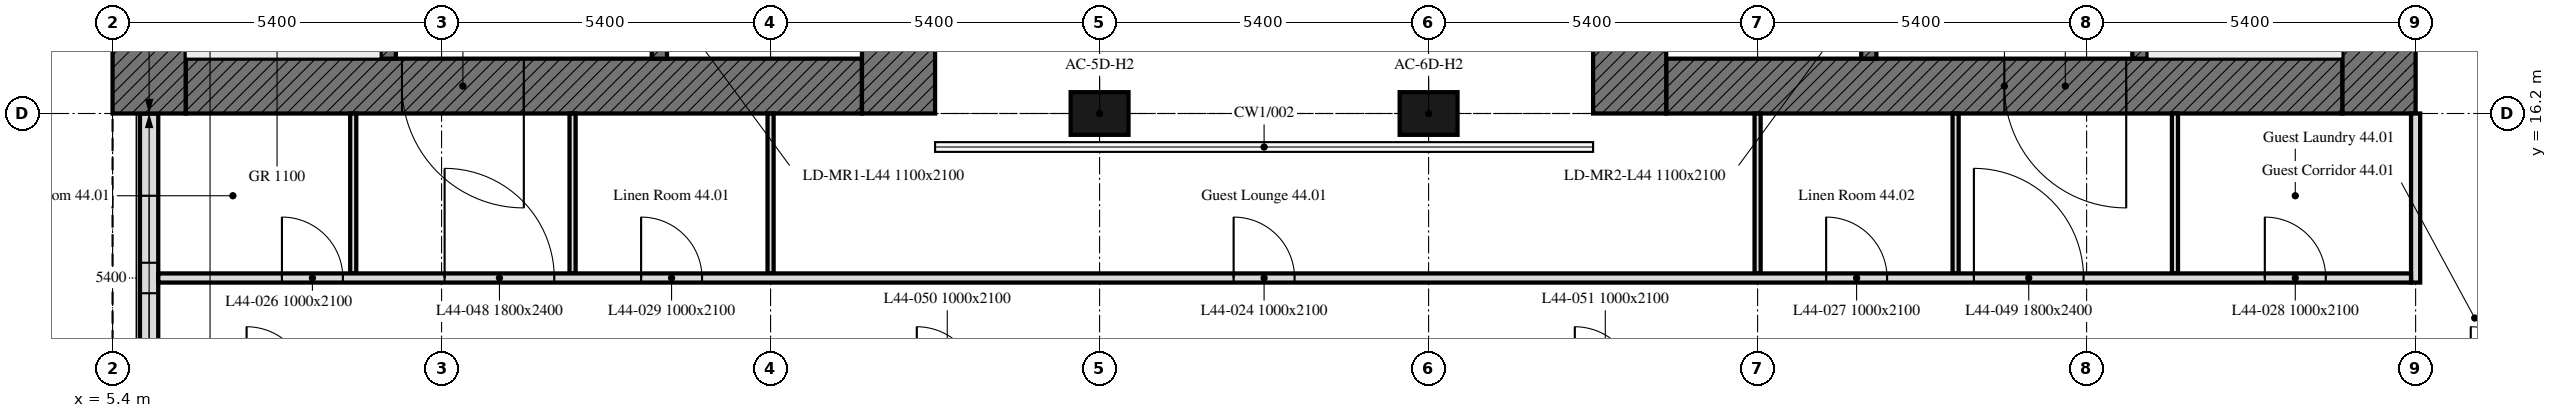
"""IFC4 building model, lengths in metres.
Left out: names, types, materials, properties, quantities, classifications, styles, units other than length and angle.
Written with IfcOpenShell. Run it as: python <this file> out.ifc"""

import sys

from ifc_helpers import new_model, si_unit, direction, frame, frame_2d, origin, origin_2d, place, context, subcontext, project, spatial, rectangle, extrude, element, fill, save


model = new_model("IFC4")
c1 = context("Model", 3, precision=1e-05, world=origin(), true_north=direction((0.0, 1.0)))
c2 = subcontext(c1, "Body", "Model", "MODEL_VIEW")
j1 = project(units=[si_unit("LENGTHUNIT", "METRE"), si_unit("PLANEANGLEUNIT", "RADIAN")], contexts=[c1])
p1 = place(None, origin())
s1 = spatial("IfcSite", under=j1, at=p1, CompositionType="ELEMENT")
p2 = place(p1, origin())
s2 = spatial("IfcBuilding", under=s1, at=p2, CompositionType="ELEMENT")
p3 = place(p2, frame((0.0, 0.0, 184.0)))
s3 = spatial("IfcBuildingStorey", under=s2, at=p3, CompositionType="ELEMENT", Elevation=184.0)
for number, where, z_axis, x_axis in (
    (1, (21.6, 16.2, 0.0), (0.0, 0.0, 1.0), (1.0, 0.0, 0.0)),
    (2, (27.0, 16.2, 0.0), (0.0, 0.0, 1.0), (1.0, 0.0, 0.0)),
):
    element("IfcColumn", number, at=place(p3, frame(where, z_axis=z_axis, x_axis=x_axis)), inside=s3, PredefinedType="COLUMN", context=c2, shape_type="SweptSolid", body=[
        extrude(rectangle(XDim=0.95, YDim=0.7, at=origin_2d()), origin(), (0.0, 0.0, 1.0), 3.0),
    ])
p4 = place(p3, frame((6.0, 16.2, 0.0), z_axis=(0.0, 0.0, 1.0), x_axis=(0.0, -1.0, 0.0)))
e3 = element("IfcWall", 3, at=p4, inside=s3, PredefinedType="SOLIDWALL", context=c2, shape_type="SweptSolid", body=[
    extrude(rectangle(XDim=5.214, YDim=0.3, at=frame_2d((2.607, 0.0))), origin(), (0.0, 0.0, 1.0), 3.0),
])
p5 = place(p4, frame((1.35, 0.0, 0.9)))
e4 = element("IfcOpeningElement", 4, at=p5, cuts=e3, PredefinedType="OPENING", context=c2, shape_type="SweptSolid", body=[
    extrude(rectangle(XDim=1.1, YDim=1.7, at=frame_2d((0.55, 0.85))), frame((0.0, 0.16, 0.0), z_axis=(0.0, -1.0, 0.0), x_axis=(1.0, 0.0, 0.0)), (0.0, 0.0, 1.0), 0.32),
])
p6 = place(p4, frame((2.95, 0.0, 0.9)))
e5 = element("IfcOpeningElement", 5, at=p6, cuts=e3, PredefinedType="OPENING", context=c2, shape_type="SweptSolid", body=[
    extrude(rectangle(XDim=1.1, YDim=1.7, at=frame_2d((0.55, 0.85))), frame((0.0, 0.16, 0.0), z_axis=(0.0, -1.0, 0.0), x_axis=(1.0, 0.0, 0.0)), (0.0, 0.0, 1.0), 0.32),
])
p7 = place(p3, frame((17.7, 16.65, 0.0), z_axis=(0.0, 0.0, 1.0), x_axis=(-1.0, 0.0, 0.0)))
e6 = element("IfcWall", 6, at=p7, inside=s3, PredefinedType="SOLIDWALL", context=c2, shape_type="SweptSolid", body=[
    extrude(rectangle(XDim=11.1, YDim=0.9, at=frame_2d((5.55, 0.0))), origin(), (0.0, 0.0, 1.0), 3.0),
])
p8 = place(p7, frame((5.55, 0.0, 0.0)))
e7 = element("IfcOpeningElement", 7, at=p8, cuts=e6, PredefinedType="OPENING", context=c2, shape_type="SweptSolid", body=[
    extrude(rectangle(XDim=2.0, YDim=2.4, at=frame_2d((1.0, 1.2))), frame((0.0, 0.45, 0.0), z_axis=(0.0, -1.0, 0.0), x_axis=(1.0, 0.0, 0.0)), (0.0, 0.0, 1.0), 0.9),
])
for number, where, z_axis, x_axis in (
    (8, (6.0, 16.2, 0.0), (0.0, 0.0, 1.0), (0.0, 1.0, 0.0)),
    (9, (18.3, 32.4, 0.0), (0.0, 0.0, 1.0), (0.0, -1.0, 0.0)),
):
    element("IfcWall", number, at=place(p3, frame(where, z_axis=z_axis, x_axis=x_axis)), inside=s3, PredefinedType="SOLIDWALL", context=c2, shape_type="SweptSolid", body=[
        extrude(rectangle(XDim=16.2, YDim=1.2, at=frame_2d((8.1, 0.0))), origin(), (0.0, 0.0, 1.0), 3.0),
    ])
p9 = place(p3, frame((9.925, 17.1, 0.0), z_axis=(0.0, 0.0, 1.0), x_axis=(0.0, 1.0, 0.0)))
e10 = element("IfcWall", 10, at=p9, inside=s3, PredefinedType="SOLIDWALL", context=c2, shape_type="SweptSolid", body=[
    extrude(rectangle(XDim=14.4, YDim=0.25, at=frame_2d((7.2, 0.0))), origin(), (0.0, 0.0, 1.0), 3.0),
])
p10 = place(p9, frame((4.6, 0.0, 0.0)))
e11 = element("IfcOpeningElement", 11, at=p10, cuts=e10, PredefinedType="OPENING", context=c2, shape_type="SweptSolid", body=[
    extrude(rectangle(XDim=1.0, YDim=2.1, at=frame_2d((0.5, 1.05))), frame((0.0, 0.125, 0.0), z_axis=(0.0, -1.0, 0.0), x_axis=(1.0, 0.0, 0.0)), (0.0, 0.0, 1.0), 0.25),
])
p11 = place(p9, frame((7.062, 0.0, 0.0)))
e12 = element("IfcOpeningElement", 12, at=p11, cuts=e10, PredefinedType="OPENING", context=c2, shape_type="SweptSolid", body=[
    extrude(rectangle(XDim=1.2, YDim=2.1, at=frame_2d((0.6, 1.05))), frame((0.0, 0.125, 0.0), z_axis=(0.0, -1.0, 0.0), x_axis=(1.0, 0.0, 0.0)), (0.0, 0.0, 1.0), 0.25),
])
p12 = place(p9, frame((9.726, 0.0, 0.0)))
e13 = element("IfcOpeningElement", 13, at=p12, cuts=e10, PredefinedType="OPENING", context=c2, shape_type="SweptSolid", body=[
    extrude(rectangle(XDim=0.9, YDim=2.1, at=frame_2d((0.45, 1.05))), frame((0.0, 0.125, 0.0), z_axis=(0.0, -1.0, 0.0), x_axis=(1.0, 0.0, 0.0)), (0.0, 0.0, 1.0), 0.25),
])
p13 = place(p9, frame((11.539, 0.0, 0.0)))
e14 = element("IfcOpeningElement", 14, at=p13, cuts=e10, PredefinedType="OPENING", context=c2, shape_type="SweptSolid", body=[
    extrude(rectangle(XDim=0.9, YDim=2.1, at=frame_2d((0.45, 1.05))), frame((0.0, 0.125, 0.0), z_axis=(0.0, -1.0, 0.0), x_axis=(1.0, 0.0, 0.0)), (0.0, 0.0, 1.0), 0.25),
])
p14 = place(p9, frame((13.226, 0.0, 0.0)))
e15 = element("IfcOpeningElement", 15, at=p14, cuts=e10, PredefinedType="OPENING", context=c2, shape_type="SweptSolid", body=[
    extrude(rectangle(XDim=0.9, YDim=2.1, at=frame_2d((0.45, 1.05))), frame((0.0, 0.125, 0.0), z_axis=(0.0, -1.0, 0.0), x_axis=(1.0, 0.0, 0.0)), (0.0, 0.0, 1.0), 0.25),
])
p15 = place(p3, frame((14.375, 17.1, 0.0), z_axis=(0.0, 0.0, 1.0), x_axis=(0.0, 1.0, 0.0)))
e16 = element("IfcWall", 16, at=p15, inside=s3, PredefinedType="SOLIDWALL", context=c2, shape_type="SweptSolid", body=[
    extrude(rectangle(XDim=14.4, YDim=0.25, at=frame_2d((7.2, 0.0))), origin(), (0.0, 0.0, 1.0), 3.0),
])
p16 = place(p15, frame((13.15, 0.0, 0.0)))
e17 = element("IfcOpeningElement", 17, at=p16, cuts=e16, PredefinedType="OPENING", context=c2, shape_type="SweptSolid", body=[
    extrude(rectangle(XDim=1.0, YDim=2.1, at=frame_2d((0.5, 1.05))), frame((0.0, 0.125, 0.0), z_axis=(0.0, -1.0, 0.0), x_axis=(1.0, 0.0, 0.0)), (0.0, 0.0, 1.0), 0.25),
])
p17 = place(p15, frame((0.6, 0.0, 0.0)))
e18 = element("IfcOpeningElement", 18, at=p17, cuts=e16, PredefinedType="OPENING", context=c2, shape_type="SweptSolid", body=[
    extrude(rectangle(XDim=1.1, YDim=2.1, at=frame_2d((0.55, 1.05))), frame((0.0, 0.125, 0.0), z_axis=(0.0, -1.0, 0.0), x_axis=(1.0, 0.0, 0.0)), (0.0, 0.0, 1.0), 0.25),
])
p18 = place(p15, frame((3.25, 0.0, 0.0)))
e19 = element("IfcOpeningElement", 19, at=p18, cuts=e16, PredefinedType="OPENING", context=c2, shape_type="SweptSolid", body=[
    extrude(rectangle(XDim=0.9, YDim=2.1, at=frame_2d((0.45, 1.05))), frame((0.0, 0.125, 0.0), z_axis=(0.0, -1.0, 0.0), x_axis=(1.0, 0.0, 0.0)), (0.0, 0.0, 1.0), 0.25),
])
p19 = place(p3, frame((42.0, 16.65, 0.0), z_axis=(0.0, 0.0, 1.0), x_axis=(-1.0, 0.0, 0.0)))
e20 = element("IfcWall", 20, at=p19, inside=s3, PredefinedType="SOLIDWALL", context=c2, shape_type="SweptSolid", body=[
    extrude(rectangle(XDim=11.1, YDim=0.9, at=frame_2d((5.55, 0.0))), origin(), (0.0, 0.0, 1.0), 3.0),
])
p20 = place(p19, frame((3.55, 0.0, 0.0)))
e21 = element("IfcOpeningElement", 21, at=p20, cuts=e20, PredefinedType="OPENING", context=c2, shape_type="SweptSolid", body=[
    extrude(rectangle(XDim=2.0, YDim=2.4, at=frame_2d((1.0, 1.2))), frame((0.0, 0.45, 0.0), z_axis=(0.0, -1.0, 0.0), x_axis=(1.0, 0.0, 0.0)), (0.0, 0.0, 1.0), 0.9),
])
for number, where, z_axis, x_axis in (
    (22, (42.6, 32.4, 0.0), (0.0, 0.0, 1.0), (0.0, -1.0, 0.0)),
    (23, (30.3, 16.2, 0.0), (0.0, 0.0, 1.0), (0.0, 1.0, 0.0)),
):
    element("IfcWall", number, at=place(p3, frame(where, z_axis=z_axis, x_axis=x_axis)), inside=s3, PredefinedType="SOLIDWALL", context=c2, shape_type="SweptSolid", body=[
        extrude(rectangle(XDim=16.2, YDim=1.2, at=frame_2d((8.1, 0.0))), origin(), (0.0, 0.0, 1.0), 3.0),
    ])
p21 = place(p3, frame((38.675, 17.1, 0.0), z_axis=(0.0, 0.0, 1.0), x_axis=(0.0, 1.0, 0.0)))
e24 = element("IfcWall", 24, at=p21, inside=s3, PredefinedType="SOLIDWALL", context=c2, shape_type="SweptSolid", body=[
    extrude(rectangle(XDim=14.4, YDim=0.25, at=frame_2d((7.2, 0.0))), origin(), (0.0, 0.0, 1.0), 3.0),
])
p22 = place(p21, frame((4.6, 0.0, 0.0)))
e25 = element("IfcOpeningElement", 25, at=p22, cuts=e24, PredefinedType="OPENING", context=c2, shape_type="SweptSolid", body=[
    extrude(rectangle(XDim=1.0, YDim=2.1, at=frame_2d((0.5, 1.05))), frame((0.0, 0.125, 0.0), z_axis=(0.0, -1.0, 0.0), x_axis=(1.0, 0.0, 0.0)), (0.0, 0.0, 1.0), 0.25),
])
p23 = place(p21, frame((7.062, 0.0, 0.0)))
e26 = element("IfcOpeningElement", 26, at=p23, cuts=e24, PredefinedType="OPENING", context=c2, shape_type="SweptSolid", body=[
    extrude(rectangle(XDim=1.2, YDim=2.1, at=frame_2d((0.6, 1.05))), frame((0.0, 0.125, 0.0), z_axis=(0.0, -1.0, 0.0), x_axis=(1.0, 0.0, 0.0)), (0.0, 0.0, 1.0), 0.25),
])
p24 = place(p21, frame((9.979, 0.0, 0.0)))
e27 = element("IfcOpeningElement", 27, at=p24, cuts=e24, PredefinedType="OPENING", context=c2, shape_type="SweptSolid", body=[
    extrude(rectangle(XDim=0.9, YDim=2.1, at=frame_2d((0.45, 1.05))), frame((0.0, 0.125, 0.0), z_axis=(0.0, -1.0, 0.0), x_axis=(1.0, 0.0, 0.0)), (0.0, 0.0, 1.0), 0.25),
])
p25 = place(p21, frame((11.92, 0.0, 0.0)))
e28 = element("IfcOpeningElement", 28, at=p25, cuts=e24, PredefinedType="OPENING", context=c2, shape_type="SweptSolid", body=[
    extrude(rectangle(XDim=0.9, YDim=2.1, at=frame_2d((0.45, 1.05))), frame((0.0, 0.125, 0.0), z_axis=(0.0, -1.0, 0.0), x_axis=(1.0, 0.0, 0.0)), (0.0, 0.0, 1.0), 0.25),
])
p26 = place(p21, frame((13.354, 0.0, 0.0)))
e29 = element("IfcOpeningElement", 29, at=p26, cuts=e24, PredefinedType="OPENING", context=c2, shape_type="SweptSolid", body=[
    extrude(rectangle(XDim=0.9, YDim=2.1, at=frame_2d((0.45, 1.05))), frame((0.0, 0.125, 0.0), z_axis=(0.0, -1.0, 0.0), x_axis=(1.0, 0.0, 0.0)), (0.0, 0.0, 1.0), 0.25),
])
p27 = place(p3, frame((34.225, 17.1, 0.0), z_axis=(0.0, 0.0, 1.0), x_axis=(0.0, 1.0, 0.0)))
e30 = element("IfcWall", 30, at=p27, inside=s3, PredefinedType="SOLIDWALL", context=c2, shape_type="SweptSolid", body=[
    extrude(rectangle(XDim=14.4, YDim=0.25, at=frame_2d((7.2, 0.0))), origin(), (0.0, 0.0, 1.0), 3.0),
])
p28 = place(p27, frame((13.15, 0.0, 0.0)))
e31 = element("IfcOpeningElement", 31, at=p28, cuts=e30, PredefinedType="OPENING", context=c2, shape_type="SweptSolid", body=[
    extrude(rectangle(XDim=1.0, YDim=2.1, at=frame_2d((0.5, 1.05))), frame((0.0, 0.125, 0.0), z_axis=(0.0, -1.0, 0.0), x_axis=(1.0, 0.0, 0.0)), (0.0, 0.0, 1.0), 0.25),
])
p29 = place(p27, frame((0.6, 0.0, 0.0)))
e32 = element("IfcOpeningElement", 32, at=p29, cuts=e30, PredefinedType="OPENING", context=c2, shape_type="SweptSolid", body=[
    extrude(rectangle(XDim=1.1, YDim=2.1, at=frame_2d((0.55, 1.05))), frame((0.0, 0.125, 0.0), z_axis=(0.0, -1.0, 0.0), x_axis=(1.0, 0.0, 0.0)), (0.0, 0.0, 1.0), 0.25),
])
p30 = place(p27, frame((3.25, 0.0, 0.0)))
e33 = element("IfcOpeningElement", 33, at=p30, cuts=e30, PredefinedType="OPENING", context=c2, shape_type="SweptSolid", body=[
    extrude(rectangle(XDim=0.9, YDim=2.1, at=frame_2d((0.45, 1.05))), frame((0.0, 0.125, 0.0), z_axis=(0.0, -1.0, 0.0), x_axis=(1.0, 0.0, 0.0)), (0.0, 0.0, 1.0), 0.25),
])
for number, where, z_axis, x_axis in (
    (34, (16.2, 16.2, 0.0), (0.0, 0.0, 1.0), (0.0, -1.0, 0.0)),
    (35, (32.4, 13.575, 0.0), (0.0, 0.0, 1.0), (0.0, 1.0, 0.0)),
    (36, (9.35, 16.2, 0.0), (0.0, 0.0, 1.0), (0.0, -1.0, 0.0)),
    (37, (12.95, 13.575, 0.0), (0.0, 0.0, 1.0), (0.0, 1.0, 0.0)),
    (38, (35.65, 16.2, 0.0), (0.0, 0.0, 1.0), (0.0, -1.0, 0.0)),
    (39, (39.25, 13.575, 0.0), (0.0, 0.0, 1.0), (0.0, 1.0, 0.0)),
):
    element("IfcWall", number, at=place(p3, frame(where, z_axis=z_axis, x_axis=x_axis)), inside=s3, PredefinedType="PARTITIONING", context=c2, shape_type="SweptSolid", body=[
        extrude(rectangle(XDim=2.625, YDim=0.1, at=frame_2d((1.312, 0.0))), origin(), (0.0, 0.0, 1.0), 3.0),
    ])
p31 = place(p3, frame((43.2, 16.2, 0.0), z_axis=(0.0, 0.0, 1.0), x_axis=(0.0, -1.0, 0.0)))
e40 = element("IfcWall", 40, at=p31, inside=s3, PredefinedType="PARTITIONING", context=c2, shape_type="SweptSolid", body=[
    extrude(rectangle(XDim=2.775, YDim=0.15, at=frame_2d((1.387, 0.0))), origin(), (0.0, 0.0, 1.0), 3.0),
])
p32 = place(p3, frame((6.151, 13.5, 0.0), z_axis=(0.0, 0.0, 1.0), x_axis=(1.0, 0.0, 0.0)))
e41 = element("IfcWall", 41, at=p32, inside=s3, PredefinedType="PARTITIONING", context=c2, shape_type="SweptSolid", body=[
    extrude(rectangle(XDim=36.974, YDim=0.15, at=frame_2d((18.487, 0.0))), origin(), (0.0, 0.0, 1.0), 3.0),
])
p33 = place(p32, frame((17.649, 0.0, 0.0)))
e42 = element("IfcOpeningElement", 42, at=p33, cuts=e41, PredefinedType="OPENING", context=c2, shape_type="SweptSolid", body=[
    extrude(rectangle(XDim=1.0, YDim=2.1, at=frame_2d((0.5, 1.05))), frame((0.0, 0.075, 0.0), z_axis=(0.0, -1.0, 0.0), x_axis=(1.0, 0.0, 0.0)), (0.0, 0.0, 1.0), 0.15),
])
p34 = place(p32, frame((2.029, 0.0, 0.0)))
e43 = element("IfcOpeningElement", 43, at=p34, cuts=e41, PredefinedType="OPENING", context=c2, shape_type="SweptSolid", body=[
    extrude(rectangle(XDim=1.0, YDim=2.1, at=frame_2d((0.5, 1.05))), frame((0.0, 0.075, 0.0), z_axis=(0.0, -1.0, 0.0), x_axis=(1.0, 0.0, 0.0)), (0.0, 0.0, 1.0), 0.15),
])
p35 = place(p32, frame((27.374, 0.0, 0.0)))
e44 = element("IfcOpeningElement", 44, at=p35, cuts=e41, PredefinedType="OPENING", context=c2, shape_type="SweptSolid", body=[
    extrude(rectangle(XDim=1.0, YDim=2.1, at=frame_2d((0.5, 1.05))), frame((0.0, 0.075, 0.0), z_axis=(0.0, -1.0, 0.0), x_axis=(1.0, 0.0, 0.0)), (0.0, 0.0, 1.0), 0.15),
])
p36 = place(p32, frame((34.574, 0.0, 0.0)))
e45 = element("IfcOpeningElement", 45, at=p36, cuts=e41, PredefinedType="OPENING", context=c2, shape_type="SweptSolid", body=[
    extrude(rectangle(XDim=1.0, YDim=2.1, at=frame_2d((0.5, 1.05))), frame((0.0, 0.075, 0.0), z_axis=(0.0, -1.0, 0.0), x_axis=(1.0, 0.0, 0.0)), (0.0, 0.0, 1.0), 0.15),
])
p37 = place(p32, frame((7.924, 0.0, 0.0)))
e46 = element("IfcOpeningElement", 46, at=p37, cuts=e41, PredefinedType="OPENING", context=c2, shape_type="SweptSolid", body=[
    extrude(rectangle(XDim=1.0, YDim=2.1, at=frame_2d((0.5, 1.05))), frame((0.0, 0.075, 0.0), z_axis=(0.0, -1.0, 0.0), x_axis=(1.0, 0.0, 0.0)), (0.0, 0.0, 1.0), 0.15),
])
p38 = place(p32, frame((4.699, 0.0, 0.0)))
e47 = element("IfcOpeningElement", 47, at=p38, cuts=e41, PredefinedType="OPENING", context=c2, shape_type="SweptSolid", body=[
    extrude(rectangle(XDim=1.8, YDim=2.4, at=frame_2d((0.9, 1.2))), frame((0.0, 0.075, 0.0), z_axis=(0.0, -1.0, 0.0), x_axis=(1.0, 0.0, 0.0)), (0.0, 0.0, 1.0), 0.15),
])
p39 = place(p32, frame((29.799, 0.0, 0.0)))
e48 = element("IfcOpeningElement", 48, at=p39, cuts=e41, PredefinedType="OPENING", context=c2, shape_type="SweptSolid", body=[
    extrude(rectangle(XDim=1.8, YDim=2.4, at=frame_2d((0.9, 1.2))), frame((0.0, 0.075, 0.0), z_axis=(0.0, -1.0, 0.0), x_axis=(1.0, 0.0, 0.0)), (0.0, 0.0, 1.0), 0.15),
])
p40 = place(p5, origin())
e49 = element("IfcWindow", 49, at=p40, inside=s3, PartitioningType="SINGLE_PANEL", PredefinedType="WINDOW", context=c2, shape_type="SweptSolid", body=[
    extrude(rectangle(XDim=1.1, YDim=1.7, at=frame_2d((0.55, 0.85))), frame((0.0, 0.03, 0.0), z_axis=(0.0, -1.0, 0.0), x_axis=(1.0, 0.0, 0.0)), (0.0, 0.0, 1.0), 0.06),
])
fill(e4, e49)
p41 = place(p6, origin())
e50 = element("IfcWindow", 50, at=p41, inside=s3, PartitioningType="SINGLE_PANEL", PredefinedType="WINDOW", context=c2, shape_type="SweptSolid", body=[
    extrude(rectangle(XDim=1.1, YDim=1.7, at=frame_2d((0.55, 0.85))), frame((0.0, 0.03, 0.0), z_axis=(0.0, -1.0, 0.0), x_axis=(1.0, 0.0, 0.0)), (0.0, 0.0, 1.0), 0.06),
])
fill(e5, e50)
p42 = place(p8, origin())
e51 = element("IfcDoor", 51, at=p42, inside=s3, OperationType="DOUBLE_DOOR_SINGLE_SWING", PredefinedType="DOOR", context=c2, shape_type="SweptSolid", body=[
    extrude(rectangle(XDim=2.0, YDim=2.4, at=frame_2d((1.0, 1.2))), frame((0.0, 0.025, 0.0), z_axis=(0.0, -1.0, 0.0), x_axis=(1.0, 0.0, 0.0)), (0.0, 0.0, 1.0), 0.05),
])
fill(e7, e51)
p43 = place(p20, origin())
e52 = element("IfcDoor", 52, at=p43, inside=s3, OperationType="DOUBLE_DOOR_SINGLE_SWING", PredefinedType="DOOR", context=c2, shape_type="SweptSolid", body=[
    extrude(rectangle(XDim=2.0, YDim=2.4, at=frame_2d((1.0, 1.2))), frame((0.0, 0.025, 0.0), z_axis=(0.0, -1.0, 0.0), x_axis=(1.0, 0.0, 0.0)), (0.0, 0.0, 1.0), 0.05),
])
fill(e21, e52)
p44 = place(p33, origin())
e53 = element("IfcDoor", 53, at=p44, inside=s3, OperationType="SINGLE_SWING_RIGHT", PredefinedType="DOOR", context=c2, shape_type="SweptSolid", body=[
    extrude(rectangle(XDim=1.0, YDim=2.1, at=frame_2d((0.5, 1.05))), frame((0.0, 0.025, 0.0), z_axis=(0.0, -1.0, 0.0), x_axis=(1.0, 0.0, 0.0)), (0.0, 0.0, 1.0), 0.05),
])
fill(e42, e53)
p45 = place(p34, origin())
e54 = element("IfcDoor", 54, at=p45, inside=s3, OperationType="SINGLE_SWING_LEFT", PredefinedType="DOOR", context=c2, shape_type="SweptSolid", body=[
    extrude(rectangle(XDim=1.0, YDim=2.1, at=frame_2d((0.5, 1.05))), frame((0.0, 0.025, 0.0), z_axis=(0.0, -1.0, 0.0), x_axis=(1.0, 0.0, 0.0)), (0.0, 0.0, 1.0), 0.05),
])
fill(e43, e54)
p46 = place(p35, origin())
e55 = element("IfcDoor", 55, at=p46, inside=s3, OperationType="SINGLE_SWING_RIGHT", PredefinedType="DOOR", context=c2, shape_type="SweptSolid", body=[
    extrude(rectangle(XDim=1.0, YDim=2.1, at=frame_2d((0.5, 1.05))), frame((0.0, 0.025, 0.0), z_axis=(0.0, -1.0, 0.0), x_axis=(1.0, 0.0, 0.0)), (0.0, 0.0, 1.0), 0.05),
])
fill(e44, e55)
p47 = place(p36, origin())
e56 = element("IfcDoor", 56, at=p47, inside=s3, OperationType="SINGLE_SWING_LEFT", PredefinedType="DOOR", context=c2, shape_type="SweptSolid", body=[
    extrude(rectangle(XDim=1.0, YDim=2.1, at=frame_2d((0.5, 1.05))), frame((0.0, 0.025, 0.0), z_axis=(0.0, -1.0, 0.0), x_axis=(1.0, 0.0, 0.0)), (0.0, 0.0, 1.0), 0.05),
])
fill(e45, e56)
p48 = place(p37, origin())
e57 = element("IfcDoor", 57, at=p48, inside=s3, OperationType="SINGLE_SWING_RIGHT", PredefinedType="DOOR", context=c2, shape_type="SweptSolid", body=[
    extrude(rectangle(XDim=1.0, YDim=2.1, at=frame_2d((0.5, 1.05))), frame((0.0, 0.025, 0.0), z_axis=(0.0, -1.0, 0.0), x_axis=(1.0, 0.0, 0.0)), (0.0, 0.0, 1.0), 0.05),
])
fill(e46, e57)
p49 = place(p38, origin())
e58 = element("IfcDoor", 58, at=p49, inside=s3, OperationType="DOUBLE_DOOR_SINGLE_SWING", PredefinedType="DOOR", context=c2, shape_type="SweptSolid", body=[
    extrude(rectangle(XDim=1.8, YDim=2.4, at=frame_2d((0.9, 1.2))), frame((0.0, 0.025, 0.0), z_axis=(0.0, -1.0, 0.0), x_axis=(1.0, 0.0, 0.0)), (0.0, 0.0, 1.0), 0.05),
])
fill(e47, e58)
p50 = place(p39, origin())
e59 = element("IfcDoor", 59, at=p50, inside=s3, OperationType="DOUBLE_DOOR_SINGLE_SWING", PredefinedType="DOOR", context=c2, shape_type="SweptSolid", body=[
    extrude(rectangle(XDim=1.8, YDim=2.4, at=frame_2d((0.9, 1.2))), frame((0.0, 0.025, 0.0), z_axis=(0.0, -1.0, 0.0), x_axis=(1.0, 0.0, 0.0)), (0.0, 0.0, 1.0), 0.05),
])
fill(e48, e59)
save(model, sys.argv[1])
